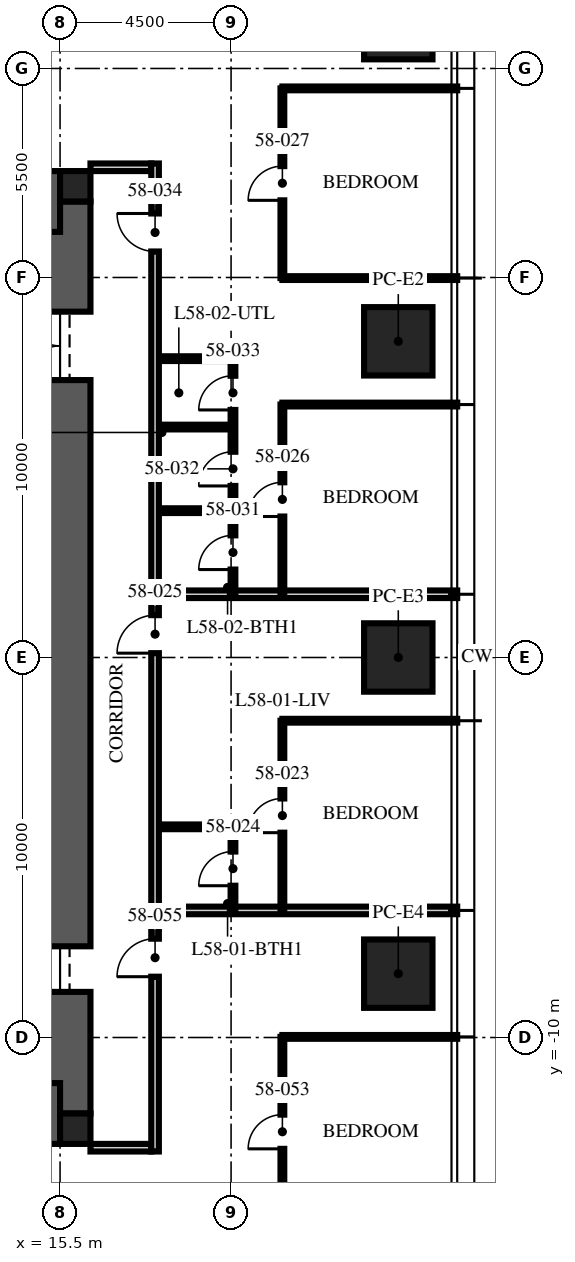
"""IFC4 building model, lengths in metres.
Left out: names, types, materials, properties, quantities, classifications, styles, units other than length and angle.
Written with IfcOpenShell. Run it as: python <this file> out.ifc"""

import sys

from ifc_helpers import new_model, si_unit, direction, frame, frame_2d, origin, origin_2d, place, context, subcontext, project, spatial, rectangle, extrude, element, fill, save


model = new_model("IFC4")
c1 = context("Model", 3, precision=1e-05, world=origin(), true_north=direction((0.0, 1.0)))
c2 = subcontext(c1, "Body", "Model", "MODEL_VIEW")
j1 = project(units=[si_unit("LENGTHUNIT", "METRE"), si_unit("PLANEANGLEUNIT", "RADIAN")], contexts=[c1])
p1 = place(None, origin())
s1 = spatial("IfcSite", under=j1, at=p1, CompositionType="ELEMENT")
p2 = place(p1, origin())
s2 = spatial("IfcBuilding", under=s1, at=p2, CompositionType="ELEMENT")
p3 = place(p2, frame((0.0, 0.0, 233.25)))
s3 = spatial("IfcBuildingStorey", under=s2, at=p3, CompositionType="ELEMENT", Elevation=233.25)
p4 = place(p3, frame((15.5, -12.0, -0.25), z_axis=(0.0, 0.0, 1.0), x_axis=(0.0, 1.0, 0.0)))
e1 = element("IfcWall", 1, at=p4, inside=s3, PredefinedType="SHEAR", context=c2, shape_type="SweptSolid", body=[
    extrude(rectangle(XDim=24.0, YDim=1.6, at=frame_2d((12.0, 0.0))), origin(), (0.0, 0.0, 1.0), 3.75),
])
p5 = place(p4, frame((3.2, 0.0, 0.25)))
e2 = element("IfcOpeningElement", 2, at=p5, cuts=e1, PredefinedType="OPENING", context=c2, shape_type="SweptSolid", body=[
    extrude(rectangle(XDim=1.2, YDim=2.1, at=frame_2d((0.6, 1.05))), frame((0.0, 0.81, 0.0), z_axis=(0.0, -1.0, 0.0), x_axis=(1.0, 0.0, 0.0)), (0.0, 0.0, 1.0), 1.62),
])
p6 = place(p4, frame((19.3, 0.0, 0.25)))
e3 = element("IfcOpeningElement", 3, at=p6, cuts=e1, PredefinedType="OPENING", context=c2, shape_type="SweptSolid", body=[
    extrude(rectangle(XDim=1.8, YDim=2.1, at=frame_2d((0.9, 1.05))), frame((0.0, 0.81, 0.0), z_axis=(0.0, -1.0, 0.0), x_axis=(1.0, 0.0, 0.0)), (0.0, 0.0, 1.0), 1.62),
])
for number, where, z_axis, x_axis in (
    (4, (-15.5, 12.0, -0.25), (0.0, 0.0, 1.0), (1.0, 0.0, 0.0)),
    (5, (-15.5, -12.0, -0.25), (0.0, 0.0, 1.0), (1.0, 0.0, 0.0)),
):
    element("IfcWall", number, at=place(p3, frame(where, z_axis=z_axis, x_axis=x_axis)), inside=s3, PredefinedType="SHEAR", context=c2, shape_type="SweptSolid", body=[
        extrude(rectangle(XDim=31.0, YDim=1.6, at=frame_2d((15.5, 0.0))), origin(), (0.0, 0.0, 1.0), 3.75),
    ])
for number, where, z_axis, x_axis in (
    (6, (15.9, 12.4, -0.25), (0.0, 0.0, 1.0), (1.0, 0.0, 0.0)),
    (7, (15.9, -12.4, -0.25), (0.0, 0.0, 1.0), (1.0, 0.0, 0.0)),
):
    element("IfcColumn", number, at=place(p3, frame(where, z_axis=z_axis, x_axis=x_axis)), inside=s3, PredefinedType="COLUMN", context=c2, shape_type="SweptSolid", body=[
        extrude(rectangle(XDim=0.8, YDim=0.8, at=origin_2d()), origin(), (0.0, 0.0, 1.0), 3.75),
    ])
for number, where, z_axis, x_axis in (
    (8, (24.4, 16.64, 0.0), (0.0, 0.0, 1.0), (0.0, 1.0, 0.0)),
    (9, (24.4, 8.32, 0.0), (0.0, 0.0, 1.0), (0.0, 1.0, 0.0)),
    (10, (24.4, 0.0, 0.0), (0.0, 0.0, 1.0), (0.0, 1.0, 0.0)),
    (11, (24.4, -8.32, 0.0), (0.0, 0.0, 1.0), (0.0, 1.0, 0.0)),
):
    element("IfcColumn", number, at=place(p3, frame(where, z_axis=z_axis, x_axis=x_axis)), inside=s3, PredefinedType="COLUMN", context=c2, shape_type="SweptSolid", body=[
        extrude(rectangle(XDim=1.8, YDim=1.8, at=origin_2d()), origin(), (0.0, 0.0, 1.0), 3.75),
    ])
for number, where, z_axis, x_axis in (
    (12, (16.3, 12.9, 0.0), (0.0, 0.0, 1.0), (1.0, 0.0, 0.0)),
    (13, (16.3, -12.9, 0.0), (0.0, 0.0, 1.0), (1.0, 0.0, 0.0)),
):
    element("IfcWall", number, at=place(p3, frame(where, z_axis=z_axis, x_axis=x_axis)), inside=s3, PredefinedType="PARTITIONING", context=c2, shape_type="SweptSolid", body=[
        extrude(rectangle(XDim=1.6, YDim=0.2, at=frame_2d((0.8, 0.0))), origin(), (0.0, 0.0, 1.0), 2.3),
    ])
p7 = place(p3, frame((18.1, -6.656, 0.0), z_axis=(0.0, 0.0, 1.0), x_axis=(1.0, 0.0, 0.0)))
e14 = element("IfcWall", 14, at=p7, inside=s3, PredefinedType="PARTITIONING", context=c2, shape_type="SweptSolid", body=[
    extrude(rectangle(XDim=7.85, YDim=0.2, at=frame_2d((3.925, 0.0))), origin(), (0.0, 0.0, 1.0), 2.91),
])
p8 = place(p3, frame((21.35, -1.664, 0.0), z_axis=(0.0, 0.0, 1.0), x_axis=(1.0, 0.0, 0.0)))
e15 = element("IfcWall", 15, at=p8, inside=s3, PredefinedType="PARTITIONING", context=c2, shape_type="SweptSolid", body=[
    extrude(rectangle(XDim=4.6, YDim=0.1, at=frame_2d((2.3, 0.0))), origin(), (0.0, 0.0, 1.0), 2.91),
])
p9 = place(p3, frame((18.1, 1.664, 0.0), z_axis=(0.0, 0.0, 1.0), x_axis=(1.0, 0.0, 0.0)))
e16 = element("IfcWall", 16, at=p9, inside=s3, PredefinedType="PARTITIONING", context=c2, shape_type="SweptSolid", body=[
    extrude(rectangle(XDim=7.85, YDim=0.2, at=frame_2d((3.925, 0.0))), origin(), (0.0, 0.0, 1.0), 2.91),
])
for number, where, z_axis, x_axis in (
    (17, (21.35, 6.656, 0.0), (0.0, 0.0, 1.0), (1.0, 0.0, 0.0)),
    (18, (21.35, 9.984, 0.0), (0.0, 0.0, 1.0), (1.0, 0.0, 0.0)),
    (19, (21.35, 14.976, 0.0), (0.0, 0.0, 1.0), (1.0, 0.0, 0.0)),
    (20, (21.35, -9.984, 0.0), (0.0, 0.0, 1.0), (1.0, 0.0, 0.0)),
):
    element("IfcWall", number, at=place(p3, frame(where, z_axis=z_axis, x_axis=x_axis)), inside=s3, PredefinedType="PARTITIONING", context=c2, shape_type="SweptSolid", body=[
        extrude(rectangle(XDim=4.6, YDim=0.1, at=frame_2d((2.3, 0.0))), origin(), (0.0, 0.0, 1.0), 2.91),
    ])
p10 = place(p3, frame((21.35, -6.656, 0.0), z_axis=(0.0, 0.0, 1.0), x_axis=(0.0, 1.0, 0.0)))
e21 = element("IfcWall", 21, at=p10, inside=s3, PredefinedType="PARTITIONING", context=c2, shape_type="SweptSolid", body=[
    extrude(rectangle(XDim=4.992, YDim=0.1, at=frame_2d((2.496, 0.0))), origin(), (0.0, 0.0, 1.0), 2.81),
])
p11 = place(p10, frame((2.046, 0.0, 0.0)))
e22 = element("IfcOpeningElement", 22, at=p11, cuts=e21, PredefinedType="OPENING", context=c2, shape_type="SweptSolid", body=[
    extrude(rectangle(XDim=0.9, YDim=2.1, at=frame_2d((0.45, 1.05))), frame((0.0, 0.06, 0.0), z_axis=(0.0, -1.0, 0.0), x_axis=(1.0, 0.0, 0.0)), (0.0, 0.0, 1.0), 0.12),
])
p12 = place(p3, frame((20.05, -6.656, 0.0), z_axis=(0.0, 0.0, 1.0), x_axis=(0.0, 1.0, 0.0)))
e23 = element("IfcWall", 23, at=p12, inside=s3, PredefinedType="PARTITIONING", context=c2, shape_type="SweptSolid", body=[
    extrude(rectangle(XDim=2.2, YDim=0.125, at=frame_2d((1.1, 0.0))), origin(), (0.0, 0.0, 1.0), 3.5),
])
p13 = place(p12, frame((0.65, 0.0, 0.0)))
e24 = element("IfcOpeningElement", 24, at=p13, cuts=e23, PredefinedType="OPENING", context=c2, shape_type="SweptSolid", body=[
    extrude(rectangle(XDim=0.9, YDim=2.1, at=frame_2d((0.45, 1.05))), frame((0.0, 0.073, 0.0), z_axis=(0.0, -1.0, 0.0), x_axis=(1.0, 0.0, 0.0)), (0.0, 0.0, 1.0), 0.145),
])
p14 = place(p3, frame((18.1, -4.456, 0.0), z_axis=(0.0, 0.0, 1.0), x_axis=(1.0, 0.0, 0.0)))
e25 = element("IfcWall", 25, at=p14, inside=s3, PredefinedType="PARTITIONING", context=c2, shape_type="SweptSolid", body=[
    extrude(rectangle(XDim=1.95, YDim=0.125, at=frame_2d((0.975, 0.0))), origin(), (0.0, 0.0, 1.0), 3.5),
])
p15 = place(p3, frame((21.35, 1.664, 0.0), z_axis=(0.0, 0.0, 1.0), x_axis=(0.0, 1.0, 0.0)))
e26 = element("IfcWall", 26, at=p15, inside=s3, PredefinedType="PARTITIONING", context=c2, shape_type="SweptSolid", body=[
    extrude(rectangle(XDim=4.992, YDim=0.1, at=frame_2d((2.496, 0.0))), origin(), (0.0, 0.0, 1.0), 2.81),
])
p16 = place(p15, frame((2.046, 0.0, 0.0)))
e27 = element("IfcOpeningElement", 27, at=p16, cuts=e26, PredefinedType="OPENING", context=c2, shape_type="SweptSolid", body=[
    extrude(rectangle(XDim=0.9, YDim=2.1, at=frame_2d((0.45, 1.05))), frame((0.0, 0.06, 0.0), z_axis=(0.0, -1.0, 0.0), x_axis=(1.0, 0.0, 0.0)), (0.0, 0.0, 1.0), 0.12),
])
p17 = place(p3, frame((21.35, 9.984, 0.0), z_axis=(0.0, 0.0, 1.0), x_axis=(0.0, 1.0, 0.0)))
e28 = element("IfcWall", 28, at=p17, inside=s3, PredefinedType="PARTITIONING", context=c2, shape_type="SweptSolid", body=[
    extrude(rectangle(XDim=4.992, YDim=0.1, at=frame_2d((2.496, 0.0))), origin(), (0.0, 0.0, 1.0), 2.81),
])
p18 = place(p17, frame((2.046, 0.0, 0.0)))
e29 = element("IfcOpeningElement", 29, at=p18, cuts=e28, PredefinedType="OPENING", context=c2, shape_type="SweptSolid", body=[
    extrude(rectangle(XDim=0.9, YDim=2.1, at=frame_2d((0.45, 1.05))), frame((0.0, 0.06, 0.0), z_axis=(0.0, -1.0, 0.0), x_axis=(1.0, 0.0, 0.0)), (0.0, 0.0, 1.0), 0.12),
])
p19 = place(p3, frame((20.05, 1.664, 0.0), z_axis=(0.0, 0.0, 1.0), x_axis=(0.0, 1.0, 0.0)))
e30 = element("IfcWall", 30, at=p19, inside=s3, PredefinedType="PARTITIONING", context=c2, shape_type="SweptSolid", body=[
    extrude(rectangle(XDim=6.2, YDim=0.125, at=frame_2d((3.1, 0.0))), origin(), (0.0, 0.0, 1.0), 2.81),
])
p20 = place(p19, frame((0.65, 0.0, 0.0)))
e31 = element("IfcOpeningElement", 31, at=p20, cuts=e30, PredefinedType="OPENING", context=c2, shape_type="SweptSolid", body=[
    extrude(rectangle(XDim=0.9, YDim=2.1, at=frame_2d((0.45, 1.05))), frame((0.0, 0.073, 0.0), z_axis=(0.0, -1.0, 0.0), x_axis=(1.0, 0.0, 0.0)), (0.0, 0.0, 1.0), 0.145),
])
p21 = place(p19, frame((2.85, 0.0, 0.0)))
e32 = element("IfcOpeningElement", 32, at=p21, cuts=e30, PredefinedType="OPENING", context=c2, shape_type="SweptSolid", body=[
    extrude(rectangle(XDim=0.9, YDim=2.1, at=frame_2d((0.45, 1.05))), frame((0.0, 0.073, 0.0), z_axis=(0.0, -1.0, 0.0), x_axis=(1.0, 0.0, 0.0)), (0.0, 0.0, 1.0), 0.145),
])
p22 = place(p19, frame((4.85, 0.0, 0.0)))
e33 = element("IfcOpeningElement", 33, at=p22, cuts=e30, PredefinedType="OPENING", context=c2, shape_type="SweptSolid", body=[
    extrude(rectangle(XDim=0.9, YDim=2.1, at=frame_2d((0.45, 1.05))), frame((0.0, 0.073, 0.0), z_axis=(0.0, -1.0, 0.0), x_axis=(1.0, 0.0, 0.0)), (0.0, 0.0, 1.0), 0.145),
])
for number, where, z_axis, x_axis in (
    (34, (18.1, 3.864, 0.0), (0.0, 0.0, 1.0), (1.0, 0.0, 0.0)),
    (35, (18.1, 6.064, 0.0), (0.0, 0.0, 1.0), (1.0, 0.0, 0.0)),
    (36, (18.1, 7.864, 0.0), (0.0, 0.0, 1.0), (1.0, 0.0, 0.0)),
):
    element("IfcWall", number, at=place(p3, frame(where, z_axis=z_axis, x_axis=x_axis)), inside=s3, PredefinedType="PARTITIONING", context=c2, shape_type="SweptSolid", body=[
        extrude(rectangle(XDim=1.95, YDim=0.125, at=frame_2d((0.975, 0.0))), origin(), (0.0, 0.0, 1.0), 3.5),
    ])
p23 = place(p3, frame((21.35, -14.976, 0.0), z_axis=(0.0, 0.0, 1.0), x_axis=(0.0, 1.0, 0.0)))
e37 = element("IfcWall", 37, at=p23, inside=s3, PredefinedType="PARTITIONING", context=c2, shape_type="SweptSolid", body=[
    extrude(rectangle(XDim=4.992, YDim=0.1, at=frame_2d((2.496, 0.0))), origin(), (0.0, 0.0, 1.0), 2.81),
])
p24 = place(p23, frame((2.046, 0.0, 0.0)))
e38 = element("IfcOpeningElement", 38, at=p24, cuts=e37, PredefinedType="OPENING", context=c2, shape_type="SweptSolid", body=[
    extrude(rectangle(XDim=0.9, YDim=2.1, at=frame_2d((0.45, 1.05))), frame((0.0, 0.06, 0.0), z_axis=(0.0, -1.0, 0.0), x_axis=(1.0, 0.0, 0.0)), (0.0, 0.0, 1.0), 0.12),
])
p25 = place(p3, frame((18.0, -13.0, 0.0), z_axis=(0.0, 0.0, 1.0), x_axis=(0.0, 1.0, 0.0)))
e39 = element("IfcWall", 39, at=p25, inside=s3, PredefinedType="PARTITIONING", context=c2, shape_type="SweptSolid", body=[
    extrude(rectangle(XDim=26.0, YDim=0.2, at=frame_2d((13.0, 0.0))), origin(), (0.0, 0.0, 1.0), 2.6),
])
p26 = place(p25, frame((13.114, 0.0, 0.0)))
e40 = element("IfcOpeningElement", 40, at=p26, cuts=e39, PredefinedType="OPENING", context=c2, shape_type="SweptSolid", body=[
    extrude(rectangle(XDim=1.0, YDim=2.2, at=frame_2d((0.5, 1.1))), frame((0.0, 0.11, 0.0), z_axis=(0.0, -1.0, 0.0), x_axis=(1.0, 0.0, 0.0)), (0.0, 0.0, 1.0), 0.22),
])
p27 = place(p25, frame((23.684, 0.0, 0.0)))
e41 = element("IfcOpeningElement", 41, at=p27, cuts=e39, PredefinedType="OPENING", context=c2, shape_type="SweptSolid", body=[
    extrude(rectangle(XDim=1.0, YDim=2.2, at=frame_2d((0.5, 1.1))), frame((0.0, 0.11, 0.0), z_axis=(0.0, -1.0, 0.0), x_axis=(1.0, 0.0, 0.0)), (0.0, 0.0, 1.0), 0.22),
])
p28 = place(p25, frame((4.6, 0.0, 0.0)))
e42 = element("IfcOpeningElement", 42, at=p28, cuts=e39, PredefinedType="OPENING", context=c2, shape_type="SweptSolid", body=[
    extrude(rectangle(XDim=1.0, YDim=2.2, at=frame_2d((0.5, 1.1))), frame((0.0, 0.11, 0.0), z_axis=(0.0, -1.0, 0.0), x_axis=(1.0, 0.0, 0.0)), (0.0, 0.0, 1.0), 0.22),
])
p29 = place(p5, origin())
e43 = element("IfcDoor", 43, at=p29, inside=s3, OperationType="SINGLE_SWING_LEFT", PredefinedType="DOOR", context=c2, shape_type="SweptSolid", body=[
    extrude(rectangle(XDim=1.2, YDim=2.1, at=frame_2d((0.6, 1.05))), frame((0.0, 0.025, 0.0), z_axis=(0.0, -1.0, 0.0), x_axis=(1.0, 0.0, 0.0)), (0.0, 0.0, 1.0), 0.05),
])
fill(e2, e43)
p30 = place(p6, origin())
e44 = element("IfcDoor", 44, at=p30, inside=s3, OperationType="DOUBLE_DOOR_SINGLE_SWING", PredefinedType="DOOR", context=c2, shape_type="SweptSolid", body=[
    extrude(rectangle(XDim=1.8, YDim=2.1, at=frame_2d((0.9, 1.05))), frame((0.0, 0.025, 0.0), z_axis=(0.0, -1.0, 0.0), x_axis=(1.0, 0.0, 0.0)), (0.0, 0.0, 1.0), 0.05),
])
fill(e3, e44)
p31 = place(p11, origin())
e45 = element("IfcDoor", 45, at=p31, inside=s3, OperationType="SINGLE_SWING_LEFT", PredefinedType="DOOR", context=c2, shape_type="SweptSolid", body=[
    extrude(rectangle(XDim=0.9, YDim=2.1, at=frame_2d((0.45, 1.05))), frame((0.0, 0.025, 0.0), z_axis=(0.0, -1.0, 0.0), x_axis=(1.0, 0.0, 0.0)), (0.0, 0.0, 1.0), 0.05),
])
fill(e22, e45)
p32 = place(p13, origin())
e46 = element("IfcDoor", 46, at=p32, inside=s3, OperationType="SINGLE_SWING_LEFT", PredefinedType="DOOR", context=c2, shape_type="SweptSolid", body=[
    extrude(rectangle(XDim=0.9, YDim=2.1, at=frame_2d((0.45, 1.05))), frame((0.0, 0.025, 0.0), z_axis=(0.0, -1.0, 0.0), x_axis=(1.0, 0.0, 0.0)), (0.0, 0.0, 1.0), 0.05),
])
fill(e24, e46)
p33 = place(p26, origin())
e47 = element("IfcDoor", 47, at=p33, inside=s3, OperationType="SINGLE_SWING_LEFT", PredefinedType="DOOR", context=c2, shape_type="SweptSolid", body=[
    extrude(rectangle(XDim=1.0, YDim=2.2, at=frame_2d((0.5, 1.1))), frame((0.0, 0.025, 0.0), z_axis=(0.0, -1.0, 0.0), x_axis=(1.0, 0.0, 0.0)), (0.0, 0.0, 1.0), 0.05),
])
fill(e40, e47)
p34 = place(p16, origin())
e48 = element("IfcDoor", 48, at=p34, inside=s3, OperationType="SINGLE_SWING_LEFT", PredefinedType="DOOR", context=c2, shape_type="SweptSolid", body=[
    extrude(rectangle(XDim=0.9, YDim=2.1, at=frame_2d((0.45, 1.05))), frame((0.0, 0.025, 0.0), z_axis=(0.0, -1.0, 0.0), x_axis=(1.0, 0.0, 0.0)), (0.0, 0.0, 1.0), 0.05),
])
fill(e27, e48)
p35 = place(p18, origin())
e49 = element("IfcDoor", 49, at=p35, inside=s3, OperationType="SINGLE_SWING_LEFT", PredefinedType="DOOR", context=c2, shape_type="SweptSolid", body=[
    extrude(rectangle(XDim=0.9, YDim=2.1, at=frame_2d((0.45, 1.05))), frame((0.0, 0.025, 0.0), z_axis=(0.0, -1.0, 0.0), x_axis=(1.0, 0.0, 0.0)), (0.0, 0.0, 1.0), 0.05),
])
fill(e29, e49)
p36 = place(p20, origin())
e50 = element("IfcDoor", 50, at=p36, inside=s3, OperationType="SINGLE_SWING_LEFT", PredefinedType="DOOR", context=c2, shape_type="SweptSolid", body=[
    extrude(rectangle(XDim=0.9, YDim=2.1, at=frame_2d((0.45, 1.05))), frame((0.0, 0.025, 0.0), z_axis=(0.0, -1.0, 0.0), x_axis=(1.0, 0.0, 0.0)), (0.0, 0.0, 1.0), 0.05),
])
fill(e31, e50)
p37 = place(p21, origin())
e51 = element("IfcDoor", 51, at=p37, inside=s3, OperationType="SINGLE_SWING_LEFT", PredefinedType="DOOR", context=c2, shape_type="SweptSolid", body=[
    extrude(rectangle(XDim=0.9, YDim=2.1, at=frame_2d((0.45, 1.05))), frame((0.0, 0.025, 0.0), z_axis=(0.0, -1.0, 0.0), x_axis=(1.0, 0.0, 0.0)), (0.0, 0.0, 1.0), 0.05),
])
fill(e32, e51)
p38 = place(p22, origin())
e52 = element("IfcDoor", 52, at=p38, inside=s3, OperationType="SINGLE_SWING_LEFT", PredefinedType="DOOR", context=c2, shape_type="SweptSolid", body=[
    extrude(rectangle(XDim=0.9, YDim=2.1, at=frame_2d((0.45, 1.05))), frame((0.0, 0.025, 0.0), z_axis=(0.0, -1.0, 0.0), x_axis=(1.0, 0.0, 0.0)), (0.0, 0.0, 1.0), 0.05),
])
fill(e33, e52)
p39 = place(p27, origin())
e53 = element("IfcDoor", 53, at=p39, inside=s3, OperationType="SINGLE_SWING_RIGHT", PredefinedType="DOOR", context=c2, shape_type="SweptSolid", body=[
    extrude(rectangle(XDim=1.0, YDim=2.2, at=frame_2d((0.5, 1.1))), frame((0.0, 0.025, 0.0), z_axis=(0.0, -1.0, 0.0), x_axis=(1.0, 0.0, 0.0)), (0.0, 0.0, 1.0), 0.05),
])
fill(e41, e53)
p40 = place(p24, origin())
e54 = element("IfcDoor", 54, at=p40, inside=s3, OperationType="SINGLE_SWING_LEFT", PredefinedType="DOOR", context=c2, shape_type="SweptSolid", body=[
    extrude(rectangle(XDim=0.9, YDim=2.1, at=frame_2d((0.45, 1.05))), frame((0.0, 0.025, 0.0), z_axis=(0.0, -1.0, 0.0), x_axis=(1.0, 0.0, 0.0)), (0.0, 0.0, 1.0), 0.05),
])
fill(e38, e54)
p41 = place(p28, origin())
e55 = element("IfcDoor", 55, at=p41, inside=s3, OperationType="SINGLE_SWING_LEFT", PredefinedType="DOOR", context=c2, shape_type="SweptSolid", body=[
    extrude(rectangle(XDim=1.0, YDim=2.2, at=frame_2d((0.5, 1.1))), frame((0.0, 0.025, 0.0), z_axis=(0.0, -1.0, 0.0), x_axis=(1.0, 0.0, 0.0)), (0.0, 0.0, 1.0), 0.05),
])
fill(e42, e55)
save(model, sys.argv[1])
